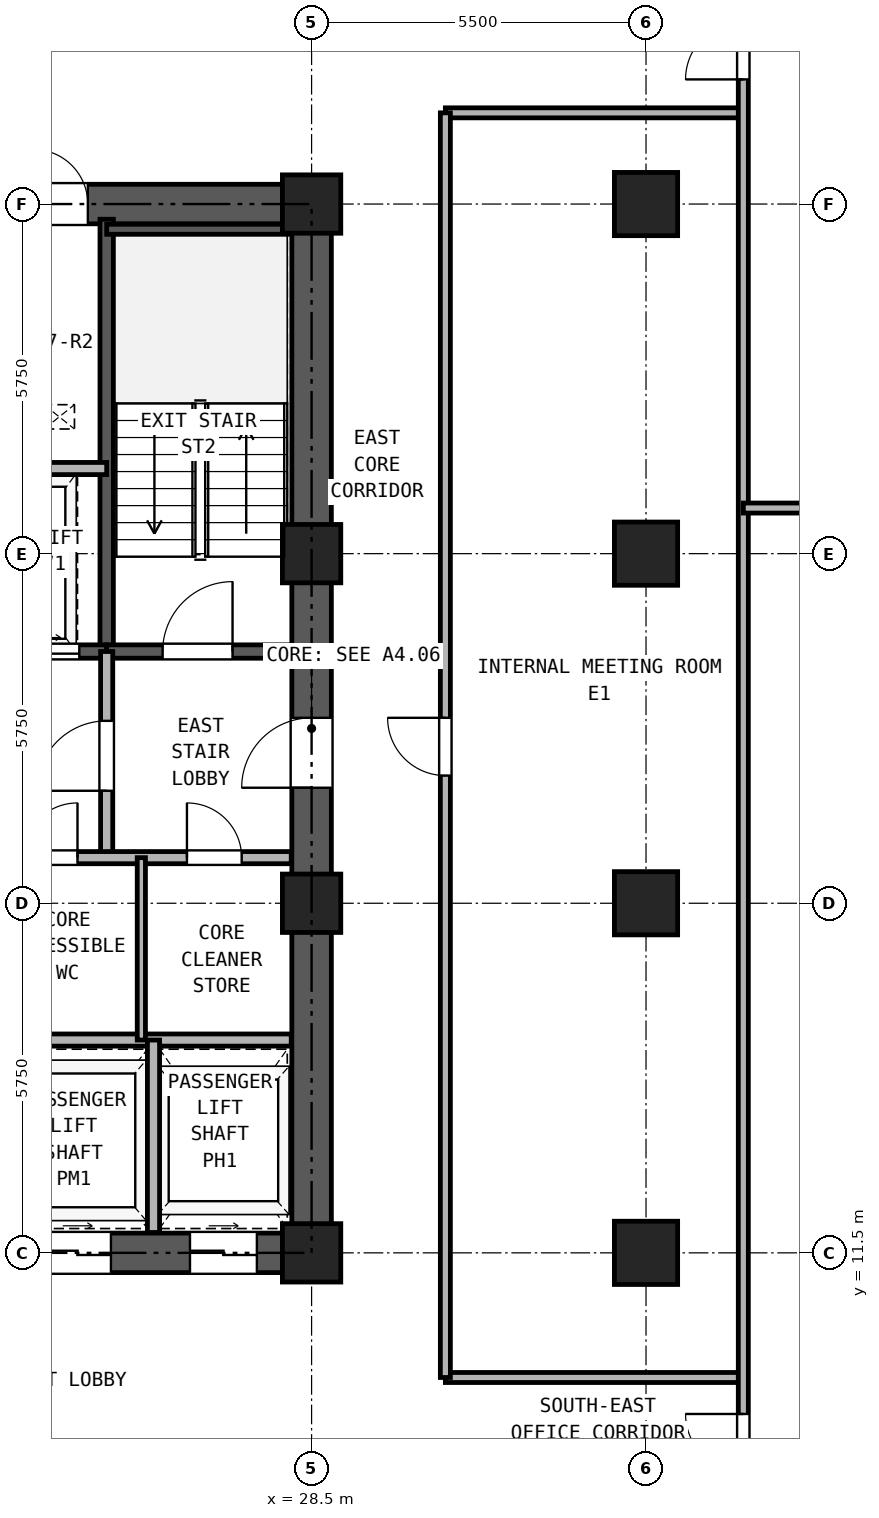
"""IFC4 building model, lengths in metres.
Left out: names, types, materials, properties, quantities, classifications, styles, units other than length and angle.
Written with IfcOpenShell. Run it as: python <this file> out.ifc"""

import sys

from ifc_helpers import new_model, si_unit, direction, frame, frame_2d, origin, origin_2d, place, context, subcontext, project, spatial, rectangle, hollow_rectangle, extrude, source, transform, mapped, element, fill, save


model = new_model("IFC4")
c1 = context("Model", 3, precision=1e-05, world=origin(), true_north=direction((0.0, 1.0)))
c2 = subcontext(c1, "Body", "Model", "MODEL_VIEW")
j1 = project(units=[si_unit("LENGTHUNIT", "METRE"), si_unit("PLANEANGLEUNIT", "RADIAN")], contexts=[c1])
p1 = place(None, origin())
s1 = spatial("IfcSite", under=j1, at=p1, CompositionType="ELEMENT")
p2 = place(p1, origin())
s2 = spatial("IfcBuilding", under=s1, at=p2, CompositionType="ELEMENT")
p3 = place(p2, frame((0.0, 0.0, 29.7)))
s3 = spatial("IfcBuildingStorey", under=s2, at=p3, CompositionType="ELEMENT", Elevation=29.7)
m1 = source(origin(), c2, "Body", "SweptSolid", [
    extrude(hollow_rectangle(XDim=0.96, YDim=0.96, WallThickness=0.06, at=origin_2d()), origin(), (0.0, 0.0, 1.0), 3.32),
])
for number, where, z_axis, x_axis in (
    (1, (28.5, 11.5, 0.0), (0.0, 0.0, 1.0), (1.0, 0.0, 0.0)),
    (2, (28.5, 17.25, 0.0), (0.0, 0.0, 1.0), (1.0, 0.0, 0.0)),
    (3, (28.5, 23.0, 0.0), (0.0, 0.0, 1.0), (1.0, 0.0, 0.0)),
    (4, (28.5, 28.75, 0.0), (0.0, 0.0, 1.0), (1.0, 0.0, 0.0)),
):
    element("IfcColumn", number, at=place(p3, frame(where, z_axis=z_axis, x_axis=x_axis)), inside=s3, PredefinedType="COLUMN", context=c2, shape_type="MappedRepresentation", body=[
        mapped(m1, transform((0.0, 0.0, 0.0), x_axis=(1.0, 0.0, 0.0), y_axis=(0.0, 1.0, 0.0), z_axis=(0.0, 0.0, 1.0), scale=1.0)),
    ])
m2 = source(origin(), c2, "Body", "SweptSolid", [
    extrude(hollow_rectangle(XDim=1.04, YDim=1.04, WallThickness=0.065, at=origin_2d()), origin(), (0.0, 0.0, 1.0), 3.32),
])
for number, where, z_axis, x_axis in (
    (5, (34.0, 11.5, 0.0), (0.0, 0.0, 1.0), (1.0, 0.0, 0.0)),
    (6, (34.0, 17.25, 0.0), (0.0, 0.0, 1.0), (1.0, 0.0, 0.0)),
    (7, (34.0, 23.0, 0.0), (0.0, 0.0, 1.0), (1.0, 0.0, 0.0)),
    (8, (34.0, 28.75, 0.0), (0.0, 0.0, 1.0), (1.0, 0.0, 0.0)),
):
    element("IfcColumn", number, at=place(p3, frame(where, z_axis=z_axis, x_axis=x_axis)), inside=s3, PredefinedType="COLUMN", context=c2, shape_type="MappedRepresentation", body=[
        mapped(m2, transform((0.0, 0.0, 0.0), x_axis=(1.0, 0.0, 0.0), y_axis=(0.0, 1.0, 0.0), z_axis=(0.0, 0.0, 1.0), scale=1.0)),
    ])
p4 = place(p3, frame((18.175, 11.5, 0.0), z_axis=(0.0, 0.0, 1.0), x_axis=(1.0, 0.0, 0.0)))
e9 = element("IfcWall", 9, at=p4, inside=s3, PredefinedType="SHEAR", context=c2, shape_type="SweptSolid", body=[
    extrude(rectangle(XDim=10.65, YDim=0.65, at=frame_2d((5.325, 0.0))), origin(), (0.0, 0.0, 1.0), 3.32),
])
p5 = place(p4, frame((1.195, 0.0, 0.0)))
e10 = element("IfcOpeningElement", 10, at=p5, cuts=e9, PredefinedType="OPENING", context=c2, shape_type="SweptSolid", body=[
    extrude(rectangle(XDim=1.1, YDim=2.25, at=frame_2d((0.55, 1.125))), frame((0.0, 0.335, 0.0), z_axis=(0.0, -1.0, 0.0), x_axis=(1.0, 0.0, 0.0)), (0.0, 0.0, 1.0), 0.67),
])
p6 = place(p4, frame((3.495, 0.0, 0.0)))
e11 = element("IfcOpeningElement", 11, at=p6, cuts=e9, PredefinedType="OPENING", context=c2, shape_type="SweptSolid", body=[
    extrude(rectangle(XDim=1.1, YDim=2.25, at=frame_2d((0.55, 1.125))), frame((0.0, 0.335, 0.0), z_axis=(0.0, -1.0, 0.0), x_axis=(1.0, 0.0, 0.0)), (0.0, 0.0, 1.0), 0.67),
])
p7 = place(p4, frame((5.925, 0.0, 0.0)))
e12 = element("IfcOpeningElement", 12, at=p7, cuts=e9, PredefinedType="OPENING", context=c2, shape_type="SweptSolid", body=[
    extrude(rectangle(XDim=1.1, YDim=2.25, at=frame_2d((0.55, 1.125))), frame((0.0, 0.335, 0.0), z_axis=(0.0, -1.0, 0.0), x_axis=(1.0, 0.0, 0.0)), (0.0, 0.0, 1.0), 0.67),
])
p8 = place(p4, frame((8.325, 0.0, 0.0)))
e13 = element("IfcOpeningElement", 13, at=p8, cuts=e9, PredefinedType="OPENING", context=c2, shape_type="SweptSolid", body=[
    extrude(rectangle(XDim=1.1, YDim=2.25, at=frame_2d((0.55, 1.125))), frame((0.0, 0.335, 0.0), z_axis=(0.0, -1.0, 0.0), x_axis=(1.0, 0.0, 0.0)), (0.0, 0.0, 1.0), 0.67),
])
p9 = place(p3, frame((18.175, 28.75, 0.0), z_axis=(0.0, 0.0, 1.0), x_axis=(1.0, 0.0, 0.0)))
e14 = element("IfcWall", 14, at=p9, inside=s3, PredefinedType="SHEAR", context=c2, shape_type="SweptSolid", body=[
    extrude(rectangle(XDim=10.65, YDim=0.65, at=frame_2d((5.325, 0.0))), origin(), (0.0, 0.0, 1.0), 3.32),
])
p10 = place(p9, frame((4.205, 0.0, 0.0)))
e15 = element("IfcOpeningElement", 15, at=p10, cuts=e14, PredefinedType="OPENING", context=c2, shape_type="SweptSolid", body=[
    extrude(rectangle(XDim=0.9, YDim=2.05, at=frame_2d((0.45, 1.025))), frame((0.0, 0.335, 0.0), z_axis=(0.0, -1.0, 0.0), x_axis=(1.0, 0.0, 0.0)), (0.0, 0.0, 1.0), 0.67),
])
p11 = place(p9, frame((5.745, 0.0, 0.0)))
e16 = element("IfcOpeningElement", 16, at=p11, cuts=e14, PredefinedType="OPENING", context=c2, shape_type="SweptSolid", body=[
    extrude(rectangle(XDim=0.9, YDim=2.05, at=frame_2d((0.45, 1.025))), frame((0.0, 0.335, 0.0), z_axis=(0.0, -1.0, 0.0), x_axis=(1.0, 0.0, 0.0)), (0.0, 0.0, 1.0), 0.67),
])
p12 = place(p3, frame((28.5, 11.825, 0.0), z_axis=(0.0, 0.0, 1.0), x_axis=(0.0, 1.0, 0.0)))
e17 = element("IfcWall", 17, at=p12, inside=s3, PredefinedType="SHEAR", context=c2, shape_type="SweptSolid", body=[
    extrude(rectangle(XDim=16.6, YDim=0.65, at=frame_2d((8.3, 0.0))), origin(), (0.0, 0.0, 1.0), 3.32),
])
p13 = place(p12, frame((7.325, 0.0, 0.0)))
e18 = element("IfcOpeningElement", 18, at=p13, cuts=e17, PredefinedType="OPENING", context=c2, shape_type="SweptSolid", body=[
    extrude(rectangle(XDim=1.15, YDim=2.2, at=frame_2d((0.575, 1.1))), frame((0.0, 0.335, 0.0), z_axis=(0.0, -1.0, 0.0), x_axis=(1.0, 0.0, 0.0)), (0.0, 0.0, 1.0), 0.67),
])
p14 = place(p3, frame((25.13, 21.39, 0.0), z_axis=(0.0, 0.0, 1.0), x_axis=(0.0, 1.0, 0.0)))
e19 = element("IfcWall", 19, at=p14, inside=s3, PredefinedType="SOLIDWALL", context=c2, shape_type="SweptSolid", body=[
    extrude(rectangle(XDim=7.11, YDim=0.22, at=frame_2d((3.555, 0.0))), origin(), (0.0, 0.0, 1.0), 3.32),
])
p15 = place(p3, frame((25.13, 28.335, 0.0), z_axis=(0.0, 0.0, 1.0), x_axis=(1.0, 0.0, 0.0)))
e20 = element("IfcWall", 20, at=p15, inside=s3, PredefinedType="PARTITIONING", context=c2, shape_type="SweptSolid", body=[
    extrude(rectangle(XDim=3.035, YDim=0.165, at=frame_2d((1.518, 0.0))), origin(), (0.0, 0.0, 1.0), 3.32),
])
p16 = place(p3, frame((18.835, 21.39, 0.0), z_axis=(0.0, 0.0, 1.0), x_axis=(1.0, 0.0, 0.0)))
e21 = element("IfcWall", 21, at=p16, inside=s3, PredefinedType="SOLIDWALL", context=c2, shape_type="SweptSolid", body=[
    extrude(rectangle(XDim=6.295, YDim=0.22, at=frame_2d((3.147, 0.0))), origin(), (0.0, 0.0, 1.0), 3.32),
])
p17 = place(p16, frame((1.015, 0.0, 0.0)))
e22 = element("IfcOpeningElement", 22, at=p17, cuts=e21, PredefinedType="OPENING", context=c2, shape_type="SweptSolid", body=[
    extrude(rectangle(XDim=1.15, YDim=2.2, at=frame_2d((0.575, 1.1))), frame((0.0, 0.12, 0.0), z_axis=(0.0, -1.0, 0.0), x_axis=(1.0, 0.0, 0.0)), (0.0, 0.0, 1.0), 0.24),
])
p18 = place(p16, frame((4.745, 0.0, 0.0)))
e23 = element("IfcOpeningElement", 23, at=p18, cuts=e21, PredefinedType="OPENING", context=c2, shape_type="SweptSolid", body=[
    extrude(rectangle(XDim=1.1, YDim=2.25, at=frame_2d((0.55, 1.125))), frame((0.0, 0.12, 0.0), z_axis=(0.0, -1.0, 0.0), x_axis=(1.0, 0.0, 0.0)), (0.0, 0.0, 1.0), 0.24),
])
p19 = place(p3, frame((25.13, 21.39, 0.0), z_axis=(0.0, 0.0, 1.0), x_axis=(1.0, 0.0, 0.0)))
e24 = element("IfcWall", 24, at=p19, inside=s3, PredefinedType="SOLIDWALL", context=c2, shape_type="SweptSolid", body=[
    extrude(rectangle(XDim=3.035, YDim=0.22, at=frame_2d((1.518, 0.0))), origin(), (0.0, 0.0, 1.0), 3.32),
])
p20 = place(p19, frame((0.92, 0.0, 0.0)))
e25 = element("IfcOpeningElement", 25, at=p20, cuts=e24, PredefinedType="OPENING", context=c2, shape_type="SweptSolid", body=[
    extrude(rectangle(XDim=1.15, YDim=2.2, at=frame_2d((0.575, 1.1))), frame((0.0, 0.12, 0.0), z_axis=(0.0, -1.0, 0.0), x_axis=(1.0, 0.0, 0.0)), (0.0, 0.0, 1.0), 0.24),
])
p21 = place(p3, frame((22.11, 24.4, 0.0), z_axis=(0.0, 0.0, 1.0), x_axis=(1.0, 0.0, 0.0)))
e26 = element("IfcWall", 26, at=p21, inside=s3, PredefinedType="PARTITIONING", context=c2, shape_type="SweptSolid", body=[
    extrude(rectangle(XDim=3.02, YDim=0.2, at=frame_2d((1.51, 0.0))), origin(), (0.0, 0.0, 1.0), 3.32),
])
p22 = place(p3, frame((25.13, 18.0, 0.0), z_axis=(0.0, 0.0, 1.0), x_axis=(0.0, 1.0, 0.0)))
e27 = element("IfcWall", 27, at=p22, inside=s3, PredefinedType="PARTITIONING", context=c2, shape_type="SweptSolid", body=[
    extrude(rectangle(XDim=3.39, YDim=0.2, at=frame_2d((1.695, 0.0))), origin(), (0.0, 0.0, 1.0), 3.32),
])
p23 = place(p22, frame((1.1, 0.0, 0.0)))
e28 = element("IfcOpeningElement", 28, at=p23, cuts=e27, PredefinedType="OPENING", context=c2, shape_type="SweptSolid", body=[
    extrude(rectangle(XDim=1.15, YDim=2.2, at=frame_2d((0.575, 1.1))), frame((0.0, 0.11, 0.0), z_axis=(0.0, -1.0, 0.0), x_axis=(1.0, 0.0, 0.0)), (0.0, 0.0, 1.0), 0.22),
])
p24 = place(p3, frame((18.835, 18.0, 0.0), z_axis=(0.0, 0.0, 1.0), x_axis=(1.0, 0.0, 0.0)))
e29 = element("IfcWall", 29, at=p24, inside=s3, PredefinedType="PARTITIONING", context=c2, shape_type="SweptSolid", body=[
    extrude(rectangle(XDim=9.33, YDim=0.2, at=frame_2d((4.665, 0.0))), origin(), (0.0, 0.0, 1.0), 3.32),
])
p25 = place(p24, frame((0.415, 0.0, 0.0)))
e30 = element("IfcOpeningElement", 30, at=p25, cuts=e29, PredefinedType="OPENING", context=c2, shape_type="SweptSolid", body=[
    extrude(rectangle(XDim=1.3, YDim=2.3, at=frame_2d((0.65, 1.15))), frame((0.0, 0.11, 0.0), z_axis=(0.0, -1.0, 0.0), x_axis=(1.0, 0.0, 0.0)), (0.0, 0.0, 1.0), 0.22),
])
p26 = place(p24, frame((2.515, 0.0, 0.0)))
e31 = element("IfcOpeningElement", 31, at=p26, cuts=e29, PredefinedType="OPENING", context=c2, shape_type="SweptSolid", body=[
    extrude(rectangle(XDim=1.3, YDim=2.3, at=frame_2d((0.65, 1.15))), frame((0.0, 0.11, 0.0), z_axis=(0.0, -1.0, 0.0), x_axis=(1.0, 0.0, 0.0)), (0.0, 0.0, 1.0), 0.22),
])
p27 = place(p24, frame((4.915, 0.0, 0.0)))
e32 = element("IfcOpeningElement", 32, at=p27, cuts=e29, PredefinedType="OPENING", context=c2, shape_type="SweptSolid", body=[
    extrude(rectangle(XDim=0.9, YDim=2.05, at=frame_2d((0.45, 1.025))), frame((0.0, 0.11, 0.0), z_axis=(0.0, -1.0, 0.0), x_axis=(1.0, 0.0, 0.0)), (0.0, 0.0, 1.0), 0.22),
])
p28 = place(p24, frame((7.615, 0.0, 0.0)))
e33 = element("IfcOpeningElement", 33, at=p28, cuts=e29, PredefinedType="OPENING", context=c2, shape_type="SweptSolid", body=[
    extrude(rectangle(XDim=0.9, YDim=2.05, at=frame_2d((0.45, 1.025))), frame((0.0, 0.11, 0.0), z_axis=(0.0, -1.0, 0.0), x_axis=(1.0, 0.0, 0.0)), (0.0, 0.0, 1.0), 0.22),
])
p29 = place(p3, frame((18.835, 15.0, 0.0), z_axis=(0.0, 0.0, 1.0), x_axis=(1.0, 0.0, 0.0)))
e34 = element("IfcWall", 34, at=p29, inside=s3, PredefinedType="PARTITIONING", context=c2, shape_type="SweptSolid", body=[
    extrude(rectangle(XDim=9.33, YDim=0.2, at=frame_2d((4.665, 0.0))), origin(), (0.0, 0.0, 1.0), 3.32),
])
p30 = place(p3, frame((25.7, 15.0, 0.0), z_axis=(0.0, 0.0, 1.0), x_axis=(0.0, 1.0, 0.0)))
e35 = element("IfcWall", 35, at=p30, inside=s3, PredefinedType="PARTITIONING", context=c2, shape_type="SweptSolid", body=[
    extrude(rectangle(XDim=3.0, YDim=0.135, at=frame_2d((1.5, 0.0))), origin(), (0.0, 0.0, 1.0), 3.32),
])
p31 = place(p3, frame((25.9, 11.835, 0.0), z_axis=(0.0, 0.0, 1.0), x_axis=(0.0, 1.0, 0.0)))
e36 = element("IfcWall", 36, at=p31, inside=s3, PredefinedType="PARTITIONING", context=c2, shape_type="SweptSolid", body=[
    extrude(rectangle(XDim=3.165, YDim=0.2, at=frame_2d((1.583, 0.0))), origin(), (0.0, 0.0, 1.0), 3.32),
])
for number, where, z_axis, x_axis in (
    (37, (30.7, 9.45, 0.0), (0.0, 0.0, 1.0), (1.0, 0.0, 0.0)),
    (38, (30.7, 30.25, 0.0), (0.0, 0.0, 1.0), (1.0, 0.0, 0.0)),
):
    element("IfcWall", number, at=place(p3, frame(where, z_axis=z_axis, x_axis=x_axis)), inside=s3, PredefinedType="PARTITIONING", context=c2, shape_type="SweptSolid", body=[
        extrude(rectangle(XDim=4.9, YDim=0.165, at=frame_2d((2.45, 0.0))), origin(), (0.0, 0.0, 1.0), 3.32),
    ])
p32 = place(p3, frame((30.7, 9.45, 0.0), z_axis=(0.0, 0.0, 1.0), x_axis=(0.0, 1.0, 0.0)))
e39 = element("IfcWall", 39, at=p32, inside=s3, PredefinedType="PARTITIONING", context=c2, shape_type="SweptSolid", body=[
    extrude(rectangle(XDim=20.8, YDim=0.165, at=frame_2d((10.4, 0.0))), origin(), (0.0, 0.0, 1.0), 3.32),
])
p33 = place(p32, frame((9.9, 0.0, 0.0)))
e40 = element("IfcOpeningElement", 40, at=p33, cuts=e39, PredefinedType="OPENING", context=c2, shape_type="SweptSolid", body=[
    extrude(rectangle(XDim=0.95, YDim=2.15, at=frame_2d((0.475, 1.075))), frame((0.0, 0.093, 0.0), z_axis=(0.0, -1.0, 0.0), x_axis=(1.0, 0.0, 0.0)), (0.0, 0.0, 1.0), 0.185),
])
p34 = place(p3, frame((35.6, 0.16, 0.0), z_axis=(0.0, 0.0, 1.0), x_axis=(0.0, 1.0, 0.0)))
e41 = element("IfcWall", 41, at=p34, inside=s3, PredefinedType="PARTITIONING", context=c2, shape_type="SweptSolid", body=[
    extrude(rectangle(XDim=40.18, YDim=0.165, at=frame_2d((20.09, 0.0))), origin(), (0.0, 0.0, 1.0), 3.32),
])
p35 = place(p34, frame((7.74, 0.0, 0.0)))
e42 = element("IfcOpeningElement", 42, at=p35, cuts=e41, PredefinedType="OPENING", context=c2, shape_type="SweptSolid", body=[
    extrude(rectangle(XDim=0.95, YDim=2.15, at=frame_2d((0.475, 1.075))), frame((0.0, 0.093, 0.0), z_axis=(0.0, -1.0, 0.0), x_axis=(1.0, 0.0, 0.0)), (0.0, 0.0, 1.0), 0.185),
])
p36 = place(p34, frame((30.64, 0.0, 0.0)))
e43 = element("IfcOpeningElement", 43, at=p36, cuts=e41, PredefinedType="OPENING", context=c2, shape_type="SweptSolid", body=[
    extrude(rectangle(XDim=0.95, YDim=2.15, at=frame_2d((0.475, 1.075))), frame((0.0, 0.093, 0.0), z_axis=(0.0, -1.0, 0.0), x_axis=(1.0, 0.0, 0.0)), (0.0, 0.0, 1.0), 0.185),
])
p37 = place(p3, frame((35.6, 23.75, 0.0), z_axis=(0.0, 0.0, 1.0), x_axis=(1.0, 0.0, 0.0)))
e44 = element("IfcWall", 44, at=p37, inside=s3, PredefinedType="PARTITIONING", context=c2, shape_type="SweptSolid", body=[
    extrude(rectangle(XDim=11.24, YDim=0.165, at=frame_2d((5.62, 0.0))), origin(), (0.0, 0.0, 1.0), 3.32),
])
p38 = place(p20, frame((1.15, 0.0, 0.0), z_axis=(0.0, 0.0, 1.0), x_axis=(-1.0, 0.0, 0.0)))
e45 = element("IfcDoor", 45, at=p38, inside=s3, OperationType="SINGLE_SWING_RIGHT", PredefinedType="DOOR", context=c2, shape_type="SweptSolid", body=[
    extrude(rectangle(XDim=1.15, YDim=2.2, at=frame_2d((0.575, 1.1))), frame((0.0, 0.025, 0.0), z_axis=(0.0, -1.0, 0.0), x_axis=(1.0, 0.0, 0.0)), (0.0, 0.0, 1.0), 0.05),
])
fill(e25, e45)
p39 = place(p18, frame((1.1, 0.0, 0.0), z_axis=(0.0, 0.0, 1.0), x_axis=(-1.0, 0.0, 0.0)))
e46 = element("IfcDoor", 46, at=p39, inside=s3, OperationType="DOUBLE_DOOR_SLIDING", PredefinedType="DOOR", context=c2, shape_type="SweptSolid", body=[
    extrude(rectangle(XDim=1.1, YDim=2.25, at=frame_2d((0.55, 1.125))), frame((0.0, 0.025, 0.0), z_axis=(0.0, -1.0, 0.0), x_axis=(1.0, 0.0, 0.0)), (0.0, 0.0, 1.0), 0.05),
])
fill(e23, e46)
p40 = place(p23, origin())
e47 = element("IfcDoor", 47, at=p40, inside=s3, OperationType="SINGLE_SWING_LEFT", PredefinedType="DOOR", context=c2, shape_type="SweptSolid", body=[
    extrude(rectangle(XDim=1.15, YDim=2.2, at=frame_2d((0.575, 1.1))), frame((0.0, 0.025, 0.0), z_axis=(0.0, -1.0, 0.0), x_axis=(1.0, 0.0, 0.0)), (0.0, 0.0, 1.0), 0.05),
])
fill(e28, e47)
p41 = place(p27, frame((0.9, 0.0, 0.0), z_axis=(0.0, 0.0, 1.0), x_axis=(-1.0, 0.0, 0.0)))
e48 = element("IfcDoor", 48, at=p41, inside=s3, OperationType="SINGLE_SWING_RIGHT", PredefinedType="DOOR", context=c2, shape_type="SweptSolid", body=[
    extrude(rectangle(XDim=0.9, YDim=2.05, at=frame_2d((0.45, 1.025))), frame((0.0, 0.025, 0.0), z_axis=(0.0, -1.0, 0.0), x_axis=(1.0, 0.0, 0.0)), (0.0, 0.0, 1.0), 0.05),
])
fill(e32, e48)
p42 = place(p28, frame((0.9, 0.0, 0.0), z_axis=(0.0, 0.0, 1.0), x_axis=(-1.0, 0.0, 0.0)))
e49 = element("IfcDoor", 49, at=p42, inside=s3, OperationType="SINGLE_SWING_LEFT", PredefinedType="DOOR", context=c2, shape_type="SweptSolid", body=[
    extrude(rectangle(XDim=0.9, YDim=2.05, at=frame_2d((0.45, 1.025))), frame((0.0, 0.025, 0.0), z_axis=(0.0, -1.0, 0.0), x_axis=(1.0, 0.0, 0.0)), (0.0, 0.0, 1.0), 0.05),
])
fill(e33, e49)
p43 = place(p13, origin())
e50 = element("IfcDoor", 50, at=p43, inside=s3, OperationType="SINGLE_SWING_LEFT", PredefinedType="DOOR", context=c2, shape_type="SweptSolid", body=[
    extrude(rectangle(XDim=1.15, YDim=2.2, at=frame_2d((0.575, 1.1))), frame((0.0, 0.025, 0.0), z_axis=(0.0, -1.0, 0.0), x_axis=(1.0, 0.0, 0.0)), (0.0, 0.0, 1.0), 0.05),
])
fill(e18, e50)
p44 = place(p11, origin())
e51 = element("IfcDoor", 51, at=p44, inside=s3, OperationType="SINGLE_SWING_LEFT", PredefinedType="DOOR", context=c2, shape_type="SweptSolid", body=[
    extrude(rectangle(XDim=0.9, YDim=2.05, at=frame_2d((0.45, 1.025))), frame((0.0, 0.025, 0.0), z_axis=(0.0, -1.0, 0.0), x_axis=(1.0, 0.0, 0.0)), (0.0, 0.0, 1.0), 0.05),
])
fill(e16, e51)
p45 = place(p7, frame((1.1, 0.0, 0.0), z_axis=(0.0, 0.0, 1.0), x_axis=(-1.0, 0.0, 0.0)))
e52 = element("IfcDoor", 52, at=p45, inside=s3, OperationType="DOUBLE_DOOR_SLIDING", PredefinedType="DOOR", context=c2, shape_type="SweptSolid", body=[
    extrude(rectangle(XDim=1.1, YDim=2.25, at=frame_2d((0.55, 1.125))), frame((0.0, 0.025, 0.0), z_axis=(0.0, -1.0, 0.0), x_axis=(1.0, 0.0, 0.0)), (0.0, 0.0, 1.0), 0.05),
])
fill(e12, e52)
p46 = place(p8, frame((1.1, 0.0, 0.0), z_axis=(0.0, 0.0, 1.0), x_axis=(-1.0, 0.0, 0.0)))
e53 = element("IfcDoor", 53, at=p46, inside=s3, OperationType="DOUBLE_DOOR_SLIDING", PredefinedType="DOOR", context=c2, shape_type="SweptSolid", body=[
    extrude(rectangle(XDim=1.1, YDim=2.25, at=frame_2d((0.55, 1.125))), frame((0.0, 0.025, 0.0), z_axis=(0.0, -1.0, 0.0), x_axis=(1.0, 0.0, 0.0)), (0.0, 0.0, 1.0), 0.05),
])
fill(e13, e53)
p47 = place(p35, origin())
e54 = element("IfcDoor", 54, at=p47, inside=s3, OperationType="SINGLE_SWING_RIGHT", PredefinedType="DOOR", context=c2, shape_type="SweptSolid", body=[
    extrude(rectangle(XDim=0.95, YDim=2.15, at=frame_2d((0.475, 1.075))), frame((0.0, 0.025, 0.0), z_axis=(0.0, -1.0, 0.0), x_axis=(1.0, 0.0, 0.0)), (0.0, 0.0, 1.0), 0.05),
])
fill(e42, e54)
p48 = place(p36, origin())
e55 = element("IfcDoor", 55, at=p48, inside=s3, OperationType="SINGLE_SWING_LEFT", PredefinedType="DOOR", context=c2, shape_type="SweptSolid", body=[
    extrude(rectangle(XDim=0.95, YDim=2.15, at=frame_2d((0.475, 1.075))), frame((0.0, 0.025, 0.0), z_axis=(0.0, -1.0, 0.0), x_axis=(1.0, 0.0, 0.0)), (0.0, 0.0, 1.0), 0.05),
])
fill(e43, e55)
p49 = place(p33, origin())
e56 = element("IfcDoor", 56, at=p49, inside=s3, OperationType="SINGLE_SWING_RIGHT", PredefinedType="DOOR", context=c2, shape_type="SweptSolid", body=[
    extrude(rectangle(XDim=0.95, YDim=2.15, at=frame_2d((0.475, 1.075))), frame((0.0, 0.025, 0.0), z_axis=(0.0, -1.0, 0.0), x_axis=(1.0, 0.0, 0.0)), (0.0, 0.0, 1.0), 0.05),
])
fill(e40, e56)
save(model, sys.argv[1])
